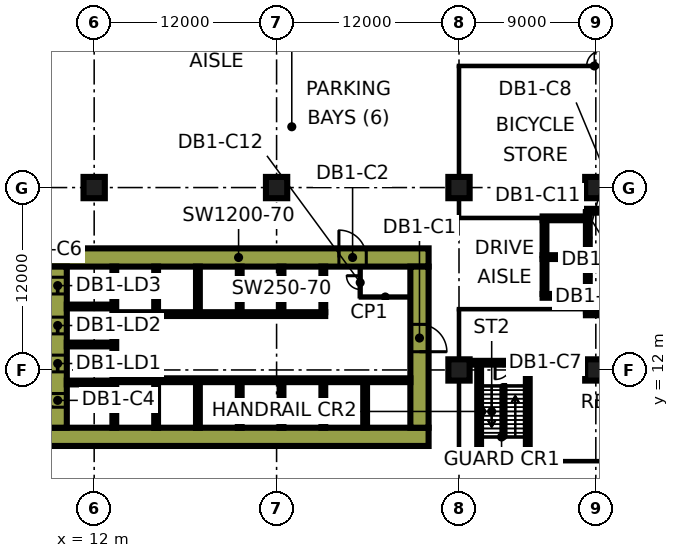
"""IFC4 building model, lengths in metres.
Left out: names, types, materials, properties, quantities, classifications, styles, units other than length and angle.
Written with IfcOpenShell. Run it as: python <this file> out.ifc"""

import sys

from ifc_helpers import new_model, si_unit, direction, frame, frame_2d, origin, origin_2d, place, context, subcontext, project, spatial, rectangle, extrude, element, fill, save


model = new_model("IFC4")
c1 = context("Model", 3, precision=1e-05, world=origin(), true_north=direction((0.0, 1.0)))
c2 = subcontext(c1, "Body", "Model", "MODEL_VIEW")
j1 = project(units=[si_unit("LENGTHUNIT", "METRE"), si_unit("PLANEANGLEUNIT", "RADIAN")], contexts=[c1])
p1 = place(None, origin())
s1 = spatial("IfcSite", under=j1, at=p1, CompositionType="ELEMENT")
p2 = place(p1, origin())
s2 = spatial("IfcBuilding", under=s1, at=p2, CompositionType="ELEMENT")
p3 = place(p2, frame((0.0, 0.0, -4.5)))
s3 = spatial("IfcBuildingStorey", under=s2, at=p3, CompositionType="ELEMENT", Elevation=-4.5)
for number, where, z_axis, x_axis in (
    (1, (12.0, 24.0, 0.0), (0.0, 0.0, 1.0), (1.0, 0.0, 0.0)),
    (2, (24.0, 24.0, 0.0), (0.0, 0.0, 1.0), (1.0, 0.0, 0.0)),
    (3, (36.0, 12.0, 0.0), (0.0, 0.0, 1.0), (1.0, 0.0, 0.0)),
    (4, (36.0, 24.0, 0.0), (0.0, 0.0, 1.0), (1.0, 0.0, 0.0)),
    (5, (45.0, 12.0, 0.0), (0.0, 0.0, 1.0), (1.0, 0.0, 0.0)),
    (6, (45.0, 24.0, 0.0), (0.0, 0.0, 1.0), (1.0, 0.0, 0.0)),
):
    element("IfcColumn", number, at=place(p3, frame(where, z_axis=z_axis, x_axis=x_axis)), inside=s3, PredefinedType="COLUMN", context=c2, shape_type="SweptSolid", body=[
        extrude(rectangle(XDim=1.4, YDim=1.4, at=origin_2d()), origin(), (0.0, 0.0, 1.0), 4.5),
    ])
p4 = place(p3, frame((9.0, 7.6, 0.0), z_axis=(0.0, 0.0, 1.0), x_axis=(1.0, 0.0, 0.0)))
e7 = element("IfcWall", 7, at=p4, inside=s3, PredefinedType="SHEAR", context=c2, shape_type="SweptSolid", body=[
    extrude(rectangle(XDim=25.0, YDim=1.2, at=frame_2d((12.5, 0.0))), origin(), (0.0, 0.0, 1.0), 4.5),
])
p5 = place(p3, frame((9.0, 19.4, 0.0), z_axis=(0.0, 0.0, 1.0), x_axis=(1.0, 0.0, 0.0)))
e8 = element("IfcWall", 8, at=p5, inside=s3, PredefinedType="SHEAR", context=c2, shape_type="SweptSolid", body=[
    extrude(rectangle(XDim=25.0, YDim=1.2, at=frame_2d((12.5, 0.0))), origin(), (0.0, 0.0, 1.0), 4.5),
])
p6 = place(p5, frame((19.1, 0.0, 0.0)))
e9 = element("IfcOpeningElement", 9, at=p6, cuts=e8, PredefinedType="OPENING", context=c2, shape_type="SweptSolid", body=[
    extrude(rectangle(XDim=1.8, YDim=2.4, at=frame_2d((0.9, 1.2))), frame((0.0, 0.61, 0.0), z_axis=(0.0, -1.0, 0.0), x_axis=(1.0, 0.0, 0.0)), (0.0, 0.0, 1.0), 1.22),
])
p7 = place(p3, frame((9.6, 8.2, 0.0), z_axis=(0.0, 0.0, 1.0), x_axis=(0.0, 1.0, 0.0)))
e10 = element("IfcWall", 10, at=p7, inside=s3, PredefinedType="SHEAR", context=c2, shape_type="SweptSolid", body=[
    extrude(rectangle(XDim=10.6, YDim=1.2, at=frame_2d((5.3, 0.0))), origin(), (0.0, 0.0, 1.0), 4.5),
])
p8 = place(p7, frame((3.675, 0.0, 0.0)))
e11 = element("IfcOpeningElement", 11, at=p8, cuts=e10, PredefinedType="OPENING", context=c2, shape_type="SweptSolid", body=[
    extrude(rectangle(XDim=1.1, YDim=2.2, at=frame_2d((0.55, 1.1))), frame((0.0, 0.61, 0.0), z_axis=(0.0, -1.0, 0.0), x_axis=(1.0, 0.0, 0.0)), (0.0, 0.0, 1.0), 1.22),
])
p9 = place(p7, frame((6.175, 0.0, 0.0)))
e12 = element("IfcOpeningElement", 12, at=p9, cuts=e10, PredefinedType="OPENING", context=c2, shape_type="SweptSolid", body=[
    extrude(rectangle(XDim=1.1, YDim=2.2, at=frame_2d((0.55, 1.1))), frame((0.0, 0.61, 0.0), z_axis=(0.0, -1.0, 0.0), x_axis=(1.0, 0.0, 0.0)), (0.0, 0.0, 1.0), 1.22),
])
p10 = place(p7, frame((8.8, 0.0, 0.0)))
e13 = element("IfcOpeningElement", 13, at=p10, cuts=e10, PredefinedType="OPENING", context=c2, shape_type="SweptSolid", body=[
    extrude(rectangle(XDim=1.1, YDim=2.2, at=frame_2d((0.55, 1.1))), frame((0.0, 0.61, 0.0), z_axis=(0.0, -1.0, 0.0), x_axis=(1.0, 0.0, 0.0)), (0.0, 0.0, 1.0), 1.22),
])
p11 = place(p7, frame((1.35, 0.0, 0.0)))
e14 = element("IfcOpeningElement", 14, at=p11, cuts=e10, PredefinedType="OPENING", context=c2, shape_type="SweptSolid", body=[
    extrude(rectangle(XDim=0.9, YDim=2.1, at=frame_2d((0.45, 1.05))), frame((0.0, 0.61, 0.0), z_axis=(0.0, -1.0, 0.0), x_axis=(1.0, 0.0, 0.0)), (0.0, 0.0, 1.0), 1.22),
])
p12 = place(p3, frame((33.4, 8.2, 0.0), z_axis=(0.0, 0.0, 1.0), x_axis=(0.0, 1.0, 0.0)))
e15 = element("IfcWall", 15, at=p12, inside=s3, PredefinedType="SHEAR", context=c2, shape_type="SweptSolid", body=[
    extrude(rectangle(XDim=10.6, YDim=1.2, at=frame_2d((5.3, 0.0))), origin(), (0.0, 0.0, 1.0), 4.5),
])
p13 = place(p12, frame((5.0, 0.0, 0.0)))
e16 = element("IfcOpeningElement", 16, at=p13, cuts=e15, PredefinedType="OPENING", context=c2, shape_type="SweptSolid", body=[
    extrude(rectangle(XDim=1.8, YDim=2.4, at=frame_2d((0.9, 1.2))), frame((0.0, 0.61, 0.0), z_axis=(0.0, -1.0, 0.0), x_axis=(1.0, 0.0, 0.0)), (0.0, 0.0, 1.0), 1.22),
])
p14 = place(p3, frame((13.325, 8.2, 0.0), z_axis=(0.0, 0.0, 1.0), x_axis=(0.0, 1.0, 0.0)))
e17 = element("IfcWall", 17, at=p14, inside=s3, PredefinedType="SHEAR", context=c2, shape_type="SweptSolid", body=[
    extrude(rectangle(XDim=10.6, YDim=0.25, at=frame_2d((5.3, 0.0))), origin(), (0.0, 0.0, 1.0), 4.5),
])
p15 = place(p3, frame((13.45, 11.325, 0.0), z_axis=(0.0, 0.0, 1.0), x_axis=(1.0, 0.0, 0.0)))
e18 = element("IfcWall", 18, at=p15, inside=s3, PredefinedType="SHEAR", context=c2, shape_type="SweptSolid", body=[
    extrude(rectangle(XDim=19.35, YDim=0.25, at=frame_2d((9.675, 0.0))), origin(), (0.0, 0.0, 1.0), 4.5),
])
p16 = place(p3, frame((13.45, 15.675, 0.0), z_axis=(0.0, 0.0, 1.0), x_axis=(1.0, 0.0, 0.0)))
e19 = element("IfcWall", 19, at=p16, inside=s3, PredefinedType="SHEAR", context=c2, shape_type="SweptSolid", body=[
    extrude(rectangle(XDim=13.75, YDim=0.25, at=frame_2d((6.875, 0.0))), origin(), (0.0, 0.0, 1.0), 4.5),
])
for number, where, z_axis, x_axis in (
    (20, (10.2, 11.175, 0.0), (0.0, 0.0, 1.0), (1.0, 0.0, 0.0)),
    (21, (10.2, 13.675, 0.0), (0.0, 0.0, 1.0), (1.0, 0.0, 0.0)),
    (22, (10.2, 16.175, 0.0), (0.0, 0.0, 1.0), (1.0, 0.0, 0.0)),
    (23, (16.075, 8.2, 0.0), (0.0, 0.0, 1.0), (0.0, 1.0, 0.0)),
    (24, (18.825, 8.2, 0.0), (0.0, 0.0, 1.0), (0.0, 1.0, 0.0)),
    (25, (21.575, 8.2, 0.0), (0.0, 0.0, 1.0), (0.0, 1.0, 0.0)),
    (26, (24.325, 8.2, 0.0), (0.0, 0.0, 1.0), (0.0, 1.0, 0.0)),
    (27, (27.075, 8.2, 0.0), (0.0, 0.0, 1.0), (0.0, 1.0, 0.0)),
    (28, (29.825, 8.2, 0.0), (0.0, 0.0, 1.0), (0.0, 1.0, 0.0)),
    (29, (16.075, 15.8, 0.0), (0.0, 0.0, 1.0), (0.0, 1.0, 0.0)),
    (30, (18.825, 15.8, 0.0), (0.0, 0.0, 1.0), (0.0, 1.0, 0.0)),
    (31, (21.575, 15.8, 0.0), (0.0, 0.0, 1.0), (0.0, 1.0, 0.0)),
    (32, (24.325, 15.8, 0.0), (0.0, 0.0, 1.0), (0.0, 1.0, 0.0)),
    (33, (27.075, 15.8, 0.0), (0.0, 0.0, 1.0), (0.0, 1.0, 0.0)),
):
    element("IfcWall", number, at=place(p3, frame(where, z_axis=z_axis, x_axis=x_axis)), inside=s3, PredefinedType="SHEAR", context=c2, shape_type="SweptSolid", body=[
        extrude(rectangle(XDim=3.0, YDim=0.25, at=frame_2d((1.5, 0.0))), origin(), (0.0, 0.0, 1.0), 4.5),
    ])
p17 = place(p3, frame((37.2, 5.725, 0.0), z_axis=(0.0, 0.0, 1.0), x_axis=(1.0, 0.0, 0.0)))
e34 = element("IfcWall", 34, at=p17, inside=s3, PredefinedType="SHEAR", context=c2, shape_type="SweptSolid", body=[
    extrude(rectangle(XDim=3.45, YDim=0.25, at=frame_2d((1.725, 0.0))), origin(), (0.0, 0.0, 1.0), 4.5),
])
p18 = place(p3, frame((36.7, 12.475, 0.0), z_axis=(0.0, 0.0, 1.0), x_axis=(1.0, 0.0, 0.0)))
e35 = element("IfcWall", 35, at=p18, inside=s3, PredefinedType="SHEAR", context=c2, shape_type="SweptSolid", body=[
    extrude(rectangle(XDim=3.95, YDim=0.25, at=frame_2d((1.975, 0.0))), origin(), (0.0, 0.0, 1.0), 4.5),
])
p19 = place(p18, frame((1.675, 0.0, 0.0)))
e36 = element("IfcOpeningElement", 36, at=p19, cuts=e35, PredefinedType="OPENING", context=c2, shape_type="SweptSolid", body=[
    extrude(rectangle(XDim=1.1, YDim=2.2, at=frame_2d((0.55, 1.1))), frame((0.0, 0.135, 0.0), z_axis=(0.0, -1.0, 0.0), x_axis=(1.0, 0.0, 0.0)), (0.0, 0.0, 1.0), 0.27),
])
for number, where, z_axis, x_axis in (
    (37, (37.325, 5.85, 0.0), (0.0, 0.0, 1.0), (0.0, 1.0, 0.0)),
    (38, (40.525, 5.85, 0.0), (0.0, 0.0, 1.0), (0.0, 1.0, 0.0)),
):
    element("IfcWall", number, at=place(p3, frame(where, z_axis=z_axis, x_axis=x_axis)), inside=s3, PredefinedType="SHEAR", context=c2, shape_type="SweptSolid", body=[
        extrude(rectangle(XDim=6.5, YDim=0.25, at=frame_2d((3.25, 0.0))), origin(), (0.0, 0.0, 1.0), 4.5),
    ])
p20 = place(p3, frame((44.35, 15.725, 0.0), z_axis=(0.0, 0.0, 1.0), x_axis=(1.0, 0.0, 0.0)))
e39 = element("IfcWall", 39, at=p20, inside=s3, PredefinedType="SHEAR", context=c2, shape_type="SweptSolid", body=[
    extrude(rectangle(XDim=3.425, YDim=0.25, at=frame_2d((1.712, 0.0))), origin(), (0.0, 0.0, 1.0), 4.5),
])
p21 = place(p20, frame((1.25, 0.0, 0.0)))
e40 = element("IfcOpeningElement", 40, at=p21, cuts=e39, PredefinedType="OPENING", context=c2, shape_type="SweptSolid", body=[
    extrude(rectangle(XDim=1.2, YDim=2.2, at=frame_2d((0.6, 1.1))), frame((0.0, 0.135, 0.0), z_axis=(0.0, -1.0, 0.0), x_axis=(1.0, 0.0, 0.0)), (0.0, 0.0, 1.0), 0.27),
])
p22 = place(p3, frame((44.35, 22.475, 0.0), z_axis=(0.0, 0.0, 1.0), x_axis=(1.0, 0.0, 0.0)))
e41 = element("IfcWall", 41, at=p22, inside=s3, PredefinedType="SHEAR", context=c2, shape_type="SweptSolid", body=[
    extrude(rectangle(XDim=3.425, YDim=0.25, at=frame_2d((1.712, 0.0))), origin(), (0.0, 0.0, 1.0), 4.5),
])
p23 = place(p3, frame((44.475, 15.85, 0.0), z_axis=(0.0, 0.0, 1.0), x_axis=(0.0, 1.0, 0.0)))
e42 = element("IfcWall", 42, at=p23, inside=s3, PredefinedType="SHEAR", context=c2, shape_type="SweptSolid", body=[
    extrude(rectangle(XDim=6.5, YDim=0.25, at=frame_2d((3.25, 0.0))), origin(), (0.0, 0.0, 1.0), 4.5),
])
p24 = place(p23, frame((1.75, 0.0, 0.0)))
e43 = element("IfcOpeningElement", 43, at=p24, cuts=e42, PredefinedType="OPENING", context=c2, shape_type="SweptSolid", body=[
    extrude(rectangle(XDim=1.1, YDim=2.2, at=frame_2d((0.55, 1.1))), frame((0.0, 0.135, 0.0), z_axis=(0.0, -1.0, 0.0), x_axis=(1.0, 0.0, 0.0)), (0.0, 0.0, 1.0), 0.27),
])
p25 = place(p23, frame((4.3, 0.0, 0.0)))
e44 = element("IfcOpeningElement", 44, at=p25, cuts=e42, PredefinedType="OPENING", context=c2, shape_type="SweptSolid", body=[
    extrude(rectangle(XDim=1.1, YDim=2.2, at=frame_2d((0.55, 1.1))), frame((0.0, 0.135, 0.0), z_axis=(0.0, -1.0, 0.0), x_axis=(1.0, 0.0, 0.0)), (0.0, 0.0, 1.0), 0.27),
])
for number, where, z_axis, x_axis in (
    (45, (41.5, 16.875, 0.0), (0.0, 0.0, 1.0), (1.0, 0.0, 0.0)),
    (46, (41.5, 19.425, 0.0), (0.0, 0.0, 1.0), (1.0, 0.0, 0.0)),
    (47, (41.5, 21.975, 0.0), (0.0, 0.0, 1.0), (1.0, 0.0, 0.0)),
):
    element("IfcWall", number, at=place(p3, frame(where, z_axis=z_axis, x_axis=x_axis)), inside=s3, PredefinedType="SHEAR", context=c2, shape_type="SweptSolid", body=[
        extrude(rectangle(XDim=2.85, YDim=0.25, at=frame_2d((1.425, 0.0))), origin(), (0.0, 0.0, 1.0), 4.5),
    ])
for number, where, z_axis, x_axis in (
    (48, (41.625, 17.0, 0.0), (0.0, 0.0, 1.0), (0.0, 1.0, 0.0)),
    (49, (41.625, 19.55, 0.0), (0.0, 0.0, 1.0), (0.0, 1.0, 0.0)),
):
    element("IfcWall", number, at=place(p3, frame(where, z_axis=z_axis, x_axis=x_axis)), inside=s3, PredefinedType="SHEAR", context=c2, shape_type="SweptSolid", body=[
        extrude(rectangle(XDim=2.3, YDim=0.25, at=frame_2d((1.15, 0.0))), origin(), (0.0, 0.0, 1.0), 4.5),
    ])
p26 = place(p3, frame((29.5, 16.8, 0.0), z_axis=(0.0, 0.0, 1.0), x_axis=(0.0, 1.0, 0.0)))
e50 = element("IfcWall", 50, at=p26, inside=s3, PredefinedType="PARTITIONING", context=c2, shape_type="SweptSolid", body=[
    extrude(rectangle(XDim=2.0, YDim=0.15, at=frame_2d((1.0, 0.0))), origin(), (0.0, 0.0, 1.0), 4.05),
])
p27 = place(p26, frame((0.5, 0.0, 0.0)))
e51 = element("IfcOpeningElement", 51, at=p27, cuts=e50, PredefinedType="OPENING", context=c2, shape_type="SweptSolid", body=[
    extrude(rectangle(XDim=0.9, YDim=2.1, at=frame_2d((0.45, 1.05))), frame((0.0, 0.085, 0.0), z_axis=(0.0, -1.0, 0.0), x_axis=(1.0, 0.0, 0.0)), (0.0, 0.0, 1.0), 0.17),
])
p28 = place(p3, frame((29.5, 16.8, 0.0), z_axis=(0.0, 0.0, 1.0), x_axis=(1.0, 0.0, 0.0)))
e52 = element("IfcWall", 52, at=p28, inside=s3, PredefinedType="PARTITIONING", context=c2, shape_type="SweptSolid", body=[
    extrude(rectangle(XDim=3.3, YDim=0.15, at=frame_2d((1.65, 0.0))), origin(), (0.0, 0.0, 1.0), 4.05),
])
p29 = place(p3, frame((35.95, 16.0, 0.0), z_axis=(0.0, 0.0, 1.0), x_axis=(1.0, 0.0, 0.0)))
e53 = element("IfcWall", 53, at=p29, inside=s3, PredefinedType="PARTITIONING", context=c2, shape_type="SweptSolid", body=[
    extrude(rectangle(XDim=8.4, YDim=0.1, at=frame_2d((4.2, 0.0))), origin(), (0.0, 0.0, 1.0), 4.05),
])
p30 = place(p3, frame((35.95, 22.0, 0.0), z_axis=(0.0, 0.0, 1.0), x_axis=(1.0, 0.0, 0.0)))
e54 = element("IfcWall", 54, at=p30, inside=s3, PredefinedType="PARTITIONING", context=c2, shape_type="SweptSolid", body=[
    extrude(rectangle(XDim=5.55, YDim=0.1, at=frame_2d((2.775, 0.0))), origin(), (0.0, 0.0, 1.0), 4.05),
])
p31 = place(p3, frame((35.95, 32.0, 0.0), z_axis=(0.0, 0.0, 1.0), x_axis=(1.0, 0.0, 0.0)))
e55 = element("IfcWall", 55, at=p31, inside=s3, PredefinedType="PARTITIONING", context=c2, shape_type="SweptSolid", body=[
    extrude(rectangle(XDim=30.1, YDim=0.1, at=frame_2d((15.05, 0.0))), origin(), (0.0, 0.0, 1.0), 4.05),
])
p32 = place(p31, frame((8.45, 0.0, 0.0)))
e56 = element("IfcOpeningElement", 56, at=p32, cuts=e55, PredefinedType="OPENING", context=c2, shape_type="SweptSolid", body=[
    extrude(rectangle(XDim=1.0, YDim=2.1, at=frame_2d((0.5, 1.05))), frame((0.0, 0.06, 0.0), z_axis=(0.0, -1.0, 0.0), x_axis=(1.0, 0.0, 0.0)), (0.0, 0.0, 1.0), 0.12),
])
p33 = place(p3, frame((36.0, 5.95, 0.0), z_axis=(0.0, 0.0, 1.0), x_axis=(0.0, 1.0, 0.0)))
e57 = element("IfcWall", 57, at=p33, inside=s3, PredefinedType="PARTITIONING", context=c2, shape_type="SweptSolid", body=[
    extrude(rectangle(XDim=5.351, YDim=0.1, at=frame_2d((2.676, 0.0))), origin(), (0.0, 0.0, 1.0), 4.05),
])
p34 = place(p3, frame((36.0, 12.699, 0.0), z_axis=(0.0, 0.0, 1.0), x_axis=(0.0, 1.0, 0.0)))
e58 = element("IfcWall", 58, at=p34, inside=s3, PredefinedType="PARTITIONING", context=c2, shape_type="SweptSolid", body=[
    extrude(rectangle(XDim=3.251, YDim=0.1, at=frame_2d((1.625, 0.0))), origin(), (0.0, 0.0, 1.0), 4.05),
])
p35 = place(p3, frame((36.0, 22.05, 0.0), z_axis=(0.0, 0.0, 1.0), x_axis=(0.0, 1.0, 0.0)))
e59 = element("IfcWall", 59, at=p35, inside=s3, PredefinedType="PARTITIONING", context=c2, shape_type="SweptSolid", body=[
    extrude(rectangle(XDim=1.251, YDim=0.1, at=frame_2d((0.625, 0.0))), origin(), (0.0, 0.0, 1.0), 4.05),
])
p36 = place(p3, frame((36.0, 24.699, 0.0), z_axis=(0.0, 0.0, 1.0), x_axis=(0.0, 1.0, 0.0)))
e60 = element("IfcWall", 60, at=p36, inside=s3, PredefinedType="PARTITIONING", context=c2, shape_type="SweptSolid", body=[
    extrude(rectangle(XDim=7.251, YDim=0.1, at=frame_2d((3.625, 0.0))), origin(), (0.0, 0.0, 1.0), 4.05),
])
p37 = place(p3, frame((36.05, 6.0, 0.0), z_axis=(0.0, 0.0, 1.0), x_axis=(1.0, 0.0, 0.0)))
e61 = element("IfcWall", 61, at=p37, inside=s3, PredefinedType="PARTITIONING", context=c2, shape_type="SweptSolid", body=[
    extrude(rectangle(XDim=1.15, YDim=0.1, at=frame_2d((0.575, 0.0))), origin(), (0.0, 0.0, 1.0), 4.05),
])
p38 = place(p3, frame((40.65, 6.0, 0.0), z_axis=(0.0, 0.0, 1.0), x_axis=(1.0, 0.0, 0.0)))
e62 = element("IfcWall", 62, at=p38, inside=s3, PredefinedType="PARTITIONING", context=c2, shape_type="SweptSolid", body=[
    extrude(rectangle(XDim=13.4, YDim=0.1, at=frame_2d((6.7, 0.0))), origin(), (0.0, 0.0, 1.0), 4.05),
])
p39 = place(p38, frame((6.2, 0.0, 0.0)))
e63 = element("IfcOpeningElement", 63, at=p39, cuts=e62, PredefinedType="OPENING", context=c2, shape_type="SweptSolid", body=[
    extrude(rectangle(XDim=1.0, YDim=2.1, at=frame_2d((0.5, 1.05))), frame((0.0, 0.06, 0.0), z_axis=(0.0, -1.0, 0.0), x_axis=(1.0, 0.0, 0.0)), (0.0, 0.0, 1.0), 0.12),
])
p40 = place(p8, origin())
e64 = element("IfcDoor", 64, at=p40, inside=s3, OperationType="DOUBLE_DOOR_SLIDING", PredefinedType="DOOR", context=c2, shape_type="SweptSolid", body=[
    extrude(rectangle(XDim=1.1, YDim=2.2, at=frame_2d((0.55, 1.1))), frame((0.0, 0.025, 0.0), z_axis=(0.0, -1.0, 0.0), x_axis=(1.0, 0.0, 0.0)), (0.0, 0.0, 1.0), 0.05),
])
fill(e11, e64)
p41 = place(p9, origin())
e65 = element("IfcDoor", 65, at=p41, inside=s3, OperationType="DOUBLE_DOOR_SLIDING", PredefinedType="DOOR", context=c2, shape_type="SweptSolid", body=[
    extrude(rectangle(XDim=1.1, YDim=2.2, at=frame_2d((0.55, 1.1))), frame((0.0, 0.025, 0.0), z_axis=(0.0, -1.0, 0.0), x_axis=(1.0, 0.0, 0.0)), (0.0, 0.0, 1.0), 0.05),
])
fill(e12, e65)
p42 = place(p10, origin())
e66 = element("IfcDoor", 66, at=p42, inside=s3, OperationType="DOUBLE_DOOR_SLIDING", PredefinedType="DOOR", context=c2, shape_type="SweptSolid", body=[
    extrude(rectangle(XDim=1.1, YDim=2.2, at=frame_2d((0.55, 1.1))), frame((0.0, 0.025, 0.0), z_axis=(0.0, -1.0, 0.0), x_axis=(1.0, 0.0, 0.0)), (0.0, 0.0, 1.0), 0.05),
])
fill(e13, e66)
p43 = place(p13, frame((1.8, 0.0, 0.0), z_axis=(0.0, 0.0, 1.0), x_axis=(-1.0, 0.0, 0.0)))
e67 = element("IfcDoor", 67, at=p43, inside=s3, OperationType="DOUBLE_DOOR_SINGLE_SWING", PredefinedType="DOOR", context=c2, shape_type="SweptSolid", body=[
    extrude(rectangle(XDim=1.8, YDim=2.4, at=frame_2d((0.9, 1.2))), frame((0.0, 0.025, 0.0), z_axis=(0.0, -1.0, 0.0), x_axis=(1.0, 0.0, 0.0)), (0.0, 0.0, 1.0), 0.05),
])
fill(e16, e67)
p44 = place(p6, origin())
e68 = element("IfcDoor", 68, at=p44, inside=s3, OperationType="DOUBLE_DOOR_SINGLE_SWING", PredefinedType="DOOR", context=c2, shape_type="SweptSolid", body=[
    extrude(rectangle(XDim=1.8, YDim=2.4, at=frame_2d((0.9, 1.2))), frame((0.0, 0.025, 0.0), z_axis=(0.0, -1.0, 0.0), x_axis=(1.0, 0.0, 0.0)), (0.0, 0.0, 1.0), 0.05),
])
fill(e9, e68)
p45 = place(p11, frame((0.9, 0.0, 0.0), z_axis=(0.0, 0.0, 1.0), x_axis=(-1.0, 0.0, 0.0)))
e69 = element("IfcDoor", 69, at=p45, inside=s3, OperationType="SINGLE_SWING_RIGHT", PredefinedType="DOOR", context=c2, shape_type="SweptSolid", body=[
    extrude(rectangle(XDim=0.9, YDim=2.1, at=frame_2d((0.45, 1.05))), frame((0.0, 0.025, 0.0), z_axis=(0.0, -1.0, 0.0), x_axis=(1.0, 0.0, 0.0)), (0.0, 0.0, 1.0), 0.05),
])
fill(e14, e69)
p46 = place(p19, frame((1.1, 0.0, 0.0), z_axis=(0.0, 0.0, 1.0), x_axis=(-1.0, 0.0, 0.0)))
e70 = element("IfcDoor", 70, at=p46, inside=s3, OperationType="SINGLE_SWING_LEFT", PredefinedType="DOOR", context=c2, shape_type="SweptSolid", body=[
    extrude(rectangle(XDim=1.1, YDim=2.2, at=frame_2d((0.55, 1.1))), frame((0.0, 0.025, 0.0), z_axis=(0.0, -1.0, 0.0), x_axis=(1.0, 0.0, 0.0)), (0.0, 0.0, 1.0), 0.05),
])
fill(e36, e70)
p47 = place(p24, origin())
e71 = element("IfcDoor", 71, at=p47, inside=s3, OperationType="DOUBLE_DOOR_SLIDING", PredefinedType="DOOR", context=c2, shape_type="SweptSolid", body=[
    extrude(rectangle(XDim=1.1, YDim=2.2, at=frame_2d((0.55, 1.1))), frame((0.0, 0.025, 0.0), z_axis=(0.0, -1.0, 0.0), x_axis=(1.0, 0.0, 0.0)), (0.0, 0.0, 1.0), 0.05),
])
fill(e43, e71)
p48 = place(p25, origin())
e72 = element("IfcDoor", 72, at=p48, inside=s3, OperationType="DOUBLE_DOOR_SLIDING", PredefinedType="DOOR", context=c2, shape_type="SweptSolid", body=[
    extrude(rectangle(XDim=1.1, YDim=2.2, at=frame_2d((0.55, 1.1))), frame((0.0, 0.025, 0.0), z_axis=(0.0, -1.0, 0.0), x_axis=(1.0, 0.0, 0.0)), (0.0, 0.0, 1.0), 0.05),
])
fill(e44, e72)
p49 = place(p27, frame((0.9, 0.0, 0.0), z_axis=(0.0, 0.0, 1.0), x_axis=(-1.0, 0.0, 0.0)))
e73 = element("IfcDoor", 73, at=p49, inside=s3, OperationType="SINGLE_SWING_RIGHT", PredefinedType="DOOR", context=c2, shape_type="SweptSolid", body=[
    extrude(rectangle(XDim=0.9, YDim=2.1, at=frame_2d((0.45, 1.05))), frame((0.0, 0.025, 0.0), z_axis=(0.0, -1.0, 0.0), x_axis=(1.0, 0.0, 0.0)), (0.0, 0.0, 1.0), 0.05),
])
fill(e51, e73)
p50 = place(p32, frame((1.0, 0.0, 0.0), z_axis=(0.0, 0.0, 1.0), x_axis=(-1.0, 0.0, 0.0)))
e74 = element("IfcDoor", 74, at=p50, inside=s3, OperationType="SINGLE_SWING_RIGHT", PredefinedType="DOOR", context=c2, shape_type="SweptSolid", body=[
    extrude(rectangle(XDim=1.0, YDim=2.1, at=frame_2d((0.5, 1.05))), frame((0.0, 0.025, 0.0), z_axis=(0.0, -1.0, 0.0), x_axis=(1.0, 0.0, 0.0)), (0.0, 0.0, 1.0), 0.05),
])
fill(e56, e74)
save(model, sys.argv[1])
